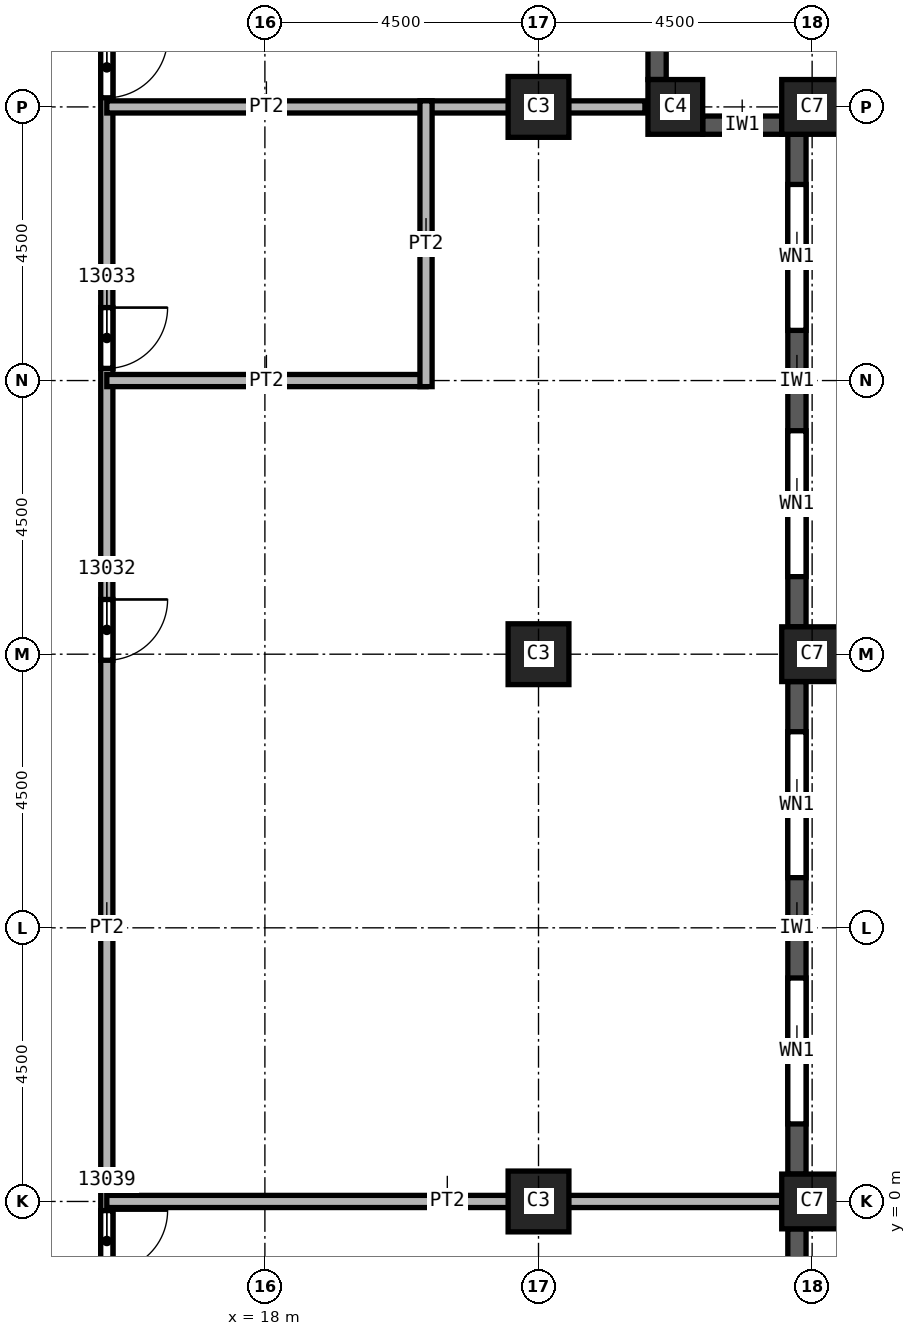
"""IFC4 building model, lengths in metres.
Left out: names, types, materials, properties, quantities, classifications, styles, units other than length and angle.
Written with IfcOpenShell. Run it as: python <this file> out.ifc"""

import sys

from ifc_helpers import new_model, si_unit, direction, frame, frame_2d, origin, origin_2d, place, context, subcontext, project, spatial, rectangle, extrude, element, fill, save


model = new_model("IFC4")
c1 = context("Model", 3, precision=1e-05, world=origin(), true_north=direction((0.0, 1.0)))
c2 = subcontext(c1, "Body", "Model", "MODEL_VIEW")
j1 = project(units=[si_unit("LENGTHUNIT", "METRE"), si_unit("PLANEANGLEUNIT", "RADIAN")], contexts=[c1])
p1 = place(None, origin())
s1 = spatial("IfcSite", under=j1, at=p1, CompositionType="ELEMENT")
p2 = place(p1, origin())
s2 = spatial("IfcBuilding", under=s1, at=p2, CompositionType="ELEMENT")
p3 = place(p2, frame((0.0, 0.0, 208.0)))
s3 = spatial("IfcBuildingStorey", under=s2, at=p3, CompositionType="ELEMENT", Elevation=208.0)
for number, where, z_axis, x_axis in (
    (1, (22.5, 0.0, 0.0), (0.0, 0.0, 1.0), (1.0, 0.0, 0.0)),
    (2, (22.5, 9.0, 0.0), (0.0, 0.0, 1.0), (1.0, 0.0, 0.0)),
    (3, (22.5, 18.0, 0.0), (0.0, 0.0, 1.0), (1.0, 0.0, 0.0)),
):
    element("IfcColumn", number, at=place(p3, frame(where, z_axis=z_axis, x_axis=x_axis)), inside=s3, PredefinedType="COLUMN", context=c2, shape_type="SweptSolid", body=[
        extrude(rectangle(XDim=1.0, YDim=1.0, at=origin_2d()), origin(), (0.0, 0.0, 1.0), 3.72),
    ])
for number, where, z_axis, x_axis in (
    (4, (27.0, 0.0, 0.0), (0.0, 0.0, 1.0), (0.0, 1.0, 0.0)),
    (5, (27.0, 9.0, 0.0), (0.0, 0.0, 1.0), (0.0, 1.0, 0.0)),
    (6, (27.0, 18.0, 0.0), (0.0, 0.0, 1.0), (0.0, 1.0, 0.0)),
):
    element("IfcColumn", number, at=place(p3, frame(where, z_axis=z_axis, x_axis=x_axis)), inside=s3, PredefinedType="COLUMN", context=c2, shape_type="SweptSolid", body=[
        extrude(rectangle(XDim=0.9, YDim=1.0, at=origin_2d()), origin(), (0.0, 0.0, 1.0), 3.72),
    ])
p4 = place(p3, frame((24.75, 18.0, 0.0), z_axis=(0.0, 0.0, 1.0), x_axis=(1.0, 0.0, 0.0)))
e7 = element("IfcColumn", 7, at=p4, inside=s3, PredefinedType="COLUMN", context=c2, shape_type="SweptSolid", body=[
    extrude(rectangle(XDim=0.9, YDim=0.9, at=origin_2d()), origin(), (0.0, 0.0, 1.0), 3.72),
])
p5 = place(p3, frame((26.75, -8.55, 0.0), z_axis=(0.0, 0.0, 1.0), x_axis=(0.0, 1.0, 0.0)))
e8 = element("IfcWall", 8, at=p5, inside=s3, PredefinedType="SOLIDWALL", context=c2, shape_type="SweptSolid", body=[
    extrude(rectangle(XDim=8.1, YDim=0.3, at=frame_2d((4.05, 0.0))), origin(), (0.0, 0.0, 1.0), 3.12),
])
p6 = place(p5, frame((0.825, 0.0, 0.8)))
e9 = element("IfcOpeningElement", 9, at=p6, cuts=e8, PredefinedType="OPENING", context=c2, shape_type="SweptSolid", body=[
    extrude(rectangle(XDim=2.4, YDim=1.95, at=frame_2d((1.2, 0.975))), frame((0.0, 0.15, 0.0), z_axis=(0.0, -1.0, 0.0), x_axis=(1.0, 0.0, 0.0)), (0.0, 0.0, 1.0), 0.3),
])
p7 = place(p5, frame((4.875, 0.0, 0.8)))
e10 = element("IfcOpeningElement", 10, at=p7, cuts=e8, PredefinedType="OPENING", context=c2, shape_type="SweptSolid", body=[
    extrude(rectangle(XDim=2.4, YDim=1.95, at=frame_2d((1.2, 0.975))), frame((0.0, 0.15, 0.0), z_axis=(0.0, -1.0, 0.0), x_axis=(1.0, 0.0, 0.0)), (0.0, 0.0, 1.0), 0.3),
])
p8 = place(p3, frame((26.75, 0.45, 0.0), z_axis=(0.0, 0.0, 1.0), x_axis=(0.0, 1.0, 0.0)))
e11 = element("IfcWall", 11, at=p8, inside=s3, PredefinedType="SOLIDWALL", context=c2, shape_type="SweptSolid", body=[
    extrude(rectangle(XDim=8.1, YDim=0.3, at=frame_2d((4.05, 0.0))), origin(), (0.0, 0.0, 1.0), 3.12),
])
p9 = place(p8, frame((0.825, 0.0, 0.8)))
e12 = element("IfcOpeningElement", 12, at=p9, cuts=e11, PredefinedType="OPENING", context=c2, shape_type="SweptSolid", body=[
    extrude(rectangle(XDim=2.4, YDim=1.95, at=frame_2d((1.2, 0.975))), frame((0.0, 0.15, 0.0), z_axis=(0.0, -1.0, 0.0), x_axis=(1.0, 0.0, 0.0)), (0.0, 0.0, 1.0), 0.3),
])
p10 = place(p8, frame((4.875, 0.0, 0.8)))
e13 = element("IfcOpeningElement", 13, at=p10, cuts=e11, PredefinedType="OPENING", context=c2, shape_type="SweptSolid", body=[
    extrude(rectangle(XDim=2.4, YDim=1.95, at=frame_2d((1.2, 0.975))), frame((0.0, 0.15, 0.0), z_axis=(0.0, -1.0, 0.0), x_axis=(1.0, 0.0, 0.0)), (0.0, 0.0, 1.0), 0.3),
])
p11 = place(p3, frame((26.75, 9.45, 0.0), z_axis=(0.0, 0.0, 1.0), x_axis=(0.0, 1.0, 0.0)))
e14 = element("IfcWall", 14, at=p11, inside=s3, PredefinedType="SOLIDWALL", context=c2, shape_type="SweptSolid", body=[
    extrude(rectangle(XDim=8.1, YDim=0.3, at=frame_2d((4.05, 0.0))), origin(), (0.0, 0.0, 1.0), 3.12),
])
p12 = place(p11, frame((0.825, 0.0, 0.8)))
e15 = element("IfcOpeningElement", 15, at=p12, cuts=e14, PredefinedType="OPENING", context=c2, shape_type="SweptSolid", body=[
    extrude(rectangle(XDim=2.4, YDim=1.95, at=frame_2d((1.2, 0.975))), frame((0.0, 0.15, 0.0), z_axis=(0.0, -1.0, 0.0), x_axis=(1.0, 0.0, 0.0)), (0.0, 0.0, 1.0), 0.3),
])
p13 = place(p11, frame((4.875, 0.0, 0.8)))
e16 = element("IfcOpeningElement", 16, at=p13, cuts=e14, PredefinedType="OPENING", context=c2, shape_type="SweptSolid", body=[
    extrude(rectangle(XDim=2.4, YDim=1.95, at=frame_2d((1.2, 0.975))), frame((0.0, 0.15, 0.0), z_axis=(0.0, -1.0, 0.0), x_axis=(1.0, 0.0, 0.0)), (0.0, 0.0, 1.0), 0.3),
])
p14 = place(p3, frame((26.5, 17.7, 0.0), z_axis=(0.0, 0.0, 1.0), x_axis=(-1.0, 0.0, 0.0)))
e17 = element("IfcWall", 17, at=p14, inside=s3, PredefinedType="SOLIDWALL", context=c2, shape_type="SweptSolid", body=[
    extrude(rectangle(XDim=1.3, YDim=0.3, at=frame_2d((0.65, 0.0))), origin(), (0.0, 0.0, 1.0), 3.12),
])
p15 = place(p3, frame((24.45, 18.45, 0.0), z_axis=(0.0, 0.0, 1.0), x_axis=(0.0, 1.0, 0.0)))
e18 = element("IfcWall", 18, at=p15, inside=s3, PredefinedType="SOLIDWALL", context=c2, shape_type="SweptSolid", body=[
    extrude(rectangle(XDim=1.5, YDim=0.3, at=frame_2d((0.75, 0.0))), origin(), (0.0, 0.0, 1.0), 3.12),
])
p16 = place(p3, frame((15.4, 22.4, 0.0), z_axis=(0.0, 0.0, 1.0), x_axis=(0.0, -1.0, 0.0)))
e19 = element("IfcWall", 19, at=p16, inside=s3, PredefinedType="PARTITIONING", context=c2, shape_type="SweptSolid", body=[
    extrude(rectangle(XDim=44.8, YDim=0.2, at=frame_2d((22.4, 0.0))), origin(), (0.0, 0.0, 1.0), 3.72),
])
p17 = place(p16, frame((12.5, 0.0, 0.0)))
e20 = element("IfcOpeningElement", 20, at=p17, cuts=e19, PredefinedType="OPENING", context=c2, shape_type="SweptSolid", body=[
    extrude(rectangle(XDim=1.0, YDim=2.1, at=frame_2d((0.5, 1.05))), frame((0.0, 0.1, 0.0), z_axis=(0.0, -1.0, 0.0), x_axis=(1.0, 0.0, 0.0)), (0.0, 0.0, 1.0), 0.2),
])
p18 = place(p16, frame((7.7, 0.0, 0.0)))
e21 = element("IfcOpeningElement", 21, at=p18, cuts=e19, PredefinedType="OPENING", context=c2, shape_type="SweptSolid", body=[
    extrude(rectangle(XDim=1.0, YDim=2.1, at=frame_2d((0.5, 1.05))), frame((0.0, 0.1, 0.0), z_axis=(0.0, -1.0, 0.0), x_axis=(1.0, 0.0, 0.0)), (0.0, 0.0, 1.0), 0.2),
])
p19 = place(p16, frame((3.25, 0.0, 0.0)))
e22 = element("IfcOpeningElement", 22, at=p19, cuts=e19, PredefinedType="OPENING", context=c2, shape_type="SweptSolid", body=[
    extrude(rectangle(XDim=1.0, YDim=2.1, at=frame_2d((0.5, 1.05))), frame((0.0, 0.1, 0.0), z_axis=(0.0, -1.0, 0.0), x_axis=(1.0, 0.0, 0.0)), (0.0, 0.0, 1.0), 0.2),
])
p20 = place(p16, frame((42.05, 0.0, 0.0)))
e23 = element("IfcOpeningElement", 23, at=p20, cuts=e19, PredefinedType="OPENING", context=c2, shape_type="SweptSolid", body=[
    extrude(rectangle(XDim=1.0, YDim=2.1, at=frame_2d((0.5, 1.05))), frame((0.0, 0.1, 0.0), z_axis=(0.0, -1.0, 0.0), x_axis=(1.0, 0.0, 0.0)), (0.0, 0.0, 1.0), 0.2),
])
p21 = place(p16, frame((34.4, 0.0, 0.0)))
e24 = element("IfcOpeningElement", 24, at=p21, cuts=e19, PredefinedType="OPENING", context=c2, shape_type="SweptSolid", body=[
    extrude(rectangle(XDim=1.0, YDim=2.1, at=frame_2d((0.5, 1.05))), frame((0.0, 0.1, 0.0), z_axis=(0.0, -1.0, 0.0), x_axis=(1.0, 0.0, 0.0)), (0.0, 0.0, 1.0), 0.2),
])
p22 = place(p16, frame((27.05, 0.0, 0.0)))
e25 = element("IfcOpeningElement", 25, at=p22, cuts=e19, PredefinedType="OPENING", context=c2, shape_type="SweptSolid", body=[
    extrude(rectangle(XDim=1.0, YDim=2.1, at=frame_2d((0.5, 1.05))), frame((0.0, 0.1, 0.0), z_axis=(0.0, -1.0, 0.0), x_axis=(1.0, 0.0, 0.0)), (0.0, 0.0, 1.0), 0.2),
])
p23 = place(p16, frame((22.55, 0.0, 0.0)))
e26 = element("IfcOpeningElement", 26, at=p23, cuts=e19, PredefinedType="OPENING", context=c2, shape_type="SweptSolid", body=[
    extrude(rectangle(XDim=1.0, YDim=2.1, at=frame_2d((0.5, 1.05))), frame((0.0, 0.1, 0.0), z_axis=(0.0, -1.0, 0.0), x_axis=(1.0, 0.0, 0.0)), (0.0, 0.0, 1.0), 0.2),
])
p24 = place(p3, frame((15.4, 13.5, 0.0), z_axis=(0.0, 0.0, 1.0), x_axis=(1.0, 0.0, 0.0)))
e27 = element("IfcWall", 27, at=p24, inside=s3, PredefinedType="PARTITIONING", context=c2, shape_type="SweptSolid", body=[
    extrude(rectangle(XDim=5.25, YDim=0.2, at=frame_2d((2.625, 0.0))), origin(), (0.0, 0.0, 1.0), 3.72),
])
p25 = place(p3, frame((15.4, 18.0, 0.0), z_axis=(0.0, 0.0, 1.0), x_axis=(1.0, 0.0, 0.0)))
e28 = element("IfcWall", 28, at=p25, inside=s3, PredefinedType="PARTITIONING", context=c2, shape_type="SweptSolid", body=[
    extrude(rectangle(XDim=8.85, YDim=0.2, at=frame_2d((4.425, 0.0))), origin(), (0.0, 0.0, 1.0), 3.72),
])
p26 = place(p3, frame((20.65, 13.4, 0.0), z_axis=(0.0, 0.0, 1.0), x_axis=(0.0, 1.0, 0.0)))
e29 = element("IfcWall", 29, at=p26, inside=s3, PredefinedType="PARTITIONING", context=c2, shape_type="SweptSolid", body=[
    extrude(rectangle(XDim=4.7, YDim=0.2, at=frame_2d((2.35, 0.0))), origin(), (0.0, 0.0, 1.0), 3.72),
])
p27 = place(p3, frame((26.5, 0.0, 0.0), z_axis=(0.0, 0.0, 1.0), x_axis=(-1.0, 0.0, 0.0)))
e30 = element("IfcWall", 30, at=p27, inside=s3, PredefinedType="PARTITIONING", context=c2, shape_type="SweptSolid", body=[
    extrude(rectangle(XDim=11.1, YDim=0.2, at=frame_2d((5.55, 0.0))), origin(), (0.0, 0.0, 1.0), 3.72),
])
p28 = place(p9, origin())
e31 = element("IfcWindow", 31, at=p28, inside=s3, PartitioningType="SINGLE_PANEL", PredefinedType="WINDOW", context=c2, shape_type="SweptSolid", body=[
    extrude(rectangle(XDim=2.4, YDim=1.95, at=frame_2d((1.2, 0.975))), frame((0.0, 0.03, 0.0), z_axis=(0.0, -1.0, 0.0), x_axis=(1.0, 0.0, 0.0)), (0.0, 0.0, 1.0), 0.06),
])
fill(e12, e31)
p29 = place(p10, origin())
e32 = element("IfcWindow", 32, at=p29, inside=s3, PartitioningType="SINGLE_PANEL", PredefinedType="WINDOW", context=c2, shape_type="SweptSolid", body=[
    extrude(rectangle(XDim=2.4, YDim=1.95, at=frame_2d((1.2, 0.975))), frame((0.0, 0.03, 0.0), z_axis=(0.0, -1.0, 0.0), x_axis=(1.0, 0.0, 0.0)), (0.0, 0.0, 1.0), 0.06),
])
fill(e13, e32)
p30 = place(p12, origin())
e33 = element("IfcWindow", 33, at=p30, inside=s3, PartitioningType="SINGLE_PANEL", PredefinedType="WINDOW", context=c2, shape_type="SweptSolid", body=[
    extrude(rectangle(XDim=2.4, YDim=1.95, at=frame_2d((1.2, 0.975))), frame((0.0, 0.03, 0.0), z_axis=(0.0, -1.0, 0.0), x_axis=(1.0, 0.0, 0.0)), (0.0, 0.0, 1.0), 0.06),
])
fill(e15, e33)
p31 = place(p13, origin())
e34 = element("IfcWindow", 34, at=p31, inside=s3, PartitioningType="SINGLE_PANEL", PredefinedType="WINDOW", context=c2, shape_type="SweptSolid", body=[
    extrude(rectangle(XDim=2.4, YDim=1.95, at=frame_2d((1.2, 0.975))), frame((0.0, 0.03, 0.0), z_axis=(0.0, -1.0, 0.0), x_axis=(1.0, 0.0, 0.0)), (0.0, 0.0, 1.0), 0.06),
])
fill(e16, e34)
p32 = place(p17, origin())
e35 = element("IfcDoor", 35, at=p32, inside=s3, OperationType="SINGLE_SWING_LEFT", PredefinedType="DOOR", context=c2, shape_type="SweptSolid", body=[
    extrude(rectangle(XDim=1.0, YDim=2.1, at=frame_2d((0.5, 1.05))), frame((0.0, 0.025, 0.0), z_axis=(0.0, -1.0, 0.0), x_axis=(1.0, 0.0, 0.0)), (0.0, 0.0, 1.0), 0.05),
])
fill(e20, e35)
p33 = place(p18, origin())
e36 = element("IfcDoor", 36, at=p33, inside=s3, OperationType="SINGLE_SWING_RIGHT", PredefinedType="DOOR", context=c2, shape_type="SweptSolid", body=[
    extrude(rectangle(XDim=1.0, YDim=2.1, at=frame_2d((0.5, 1.05))), frame((0.0, 0.025, 0.0), z_axis=(0.0, -1.0, 0.0), x_axis=(1.0, 0.0, 0.0)), (0.0, 0.0, 1.0), 0.05),
])
fill(e21, e36)
p34 = place(p19, origin())
e37 = element("IfcDoor", 37, at=p34, inside=s3, OperationType="SINGLE_SWING_LEFT", PredefinedType="DOOR", context=c2, shape_type="SweptSolid", body=[
    extrude(rectangle(XDim=1.0, YDim=2.1, at=frame_2d((0.5, 1.05))), frame((0.0, 0.025, 0.0), z_axis=(0.0, -1.0, 0.0), x_axis=(1.0, 0.0, 0.0)), (0.0, 0.0, 1.0), 0.05),
])
fill(e22, e37)
p35 = place(p23, origin())
e38 = element("IfcDoor", 38, at=p35, inside=s3, OperationType="SINGLE_SWING_RIGHT", PredefinedType="DOOR", context=c2, shape_type="SweptSolid", body=[
    extrude(rectangle(XDim=1.0, YDim=2.1, at=frame_2d((0.5, 1.05))), frame((0.0, 0.025, 0.0), z_axis=(0.0, -1.0, 0.0), x_axis=(1.0, 0.0, 0.0)), (0.0, 0.0, 1.0), 0.05),
])
fill(e26, e38)
save(model, sys.argv[1])
